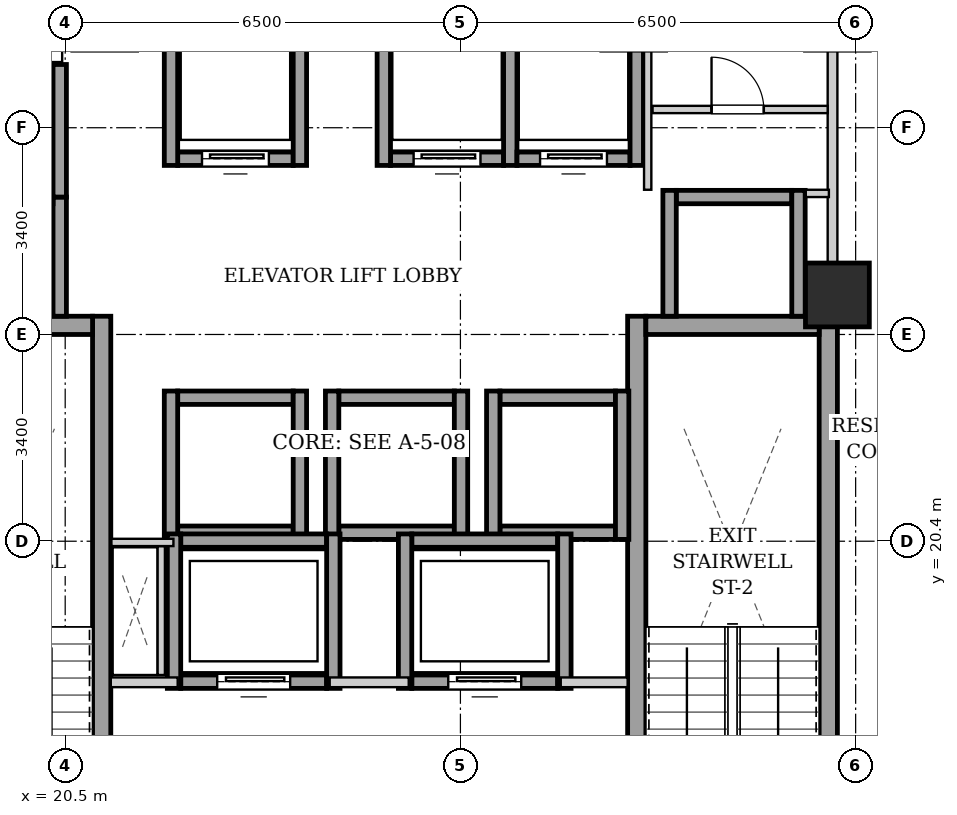
"""IFC4 building model, lengths in metres.
Left out: names, types, materials, properties, quantities, classifications, styles, units other than length and angle.
Written with IfcOpenShell. Run it as: python <this file> out.ifc"""

import sys

from ifc_helpers import new_model, si_unit, direction, frame, frame_2d, origin, origin_2d, place, context, subcontext, project, spatial, rectangle, extrude, element, fill, save


model = new_model("IFC4")
c1 = context("Model", 3, precision=1e-05, world=origin(), true_north=direction((0.0, 1.0)))
c2 = subcontext(c1, "Body", "Model", "MODEL_VIEW")
j1 = project(units=[si_unit("LENGTHUNIT", "METRE"), si_unit("PLANEANGLEUNIT", "RADIAN")], contexts=[c1])
p1 = place(None, origin())
s1 = spatial("IfcSite", under=j1, at=p1, CompositionType="ELEMENT")
p2 = place(p1, origin())
s2 = spatial("IfcBuilding", under=s1, at=p2, CompositionType="ELEMENT")
p3 = place(p2, frame((0.0, 0.0, 78.3)))
s3 = spatial("IfcBuildingStorey", under=s2, at=p3, CompositionType="ELEMENT", Elevation=78.3)
p4 = place(p3, frame((33.2, 24.45, 0.0), z_axis=(0.0, 0.0, 1.0), x_axis=(1.0, 0.0, 0.0)))
e1 = element("IfcColumn", 1, at=p4, inside=s3, PredefinedType="COLUMN", context=c2, shape_type="SweptSolid", body=[
    extrude(rectangle(XDim=1.05, YDim=1.05, at=origin_2d()), origin(), (0.0, 0.0, 1.0), 3.2),
])
p5 = place(p3, frame((21.1, 15.1, 0.0), z_axis=(0.0, 0.0, 1.0), x_axis=(0.0, 1.0, 0.0)))
e2 = element("IfcWall", 2, at=p5, inside=s3, PredefinedType="SHEAR", context=c2, shape_type="SweptSolid", body=[
    extrude(rectangle(XDim=9.0, YDim=0.3, at=frame_2d((4.5, 0.0))), origin(), (0.0, 0.0, 1.0), 2.94),
])
p6 = place(p3, frame((18.1, 23.95, 0.0), z_axis=(0.0, 0.0, 1.0), x_axis=(1.0, 0.0, 0.0)))
e3 = element("IfcWall", 3, at=p6, inside=s3, PredefinedType="SHEAR", context=c2, shape_type="SweptSolid", body=[
    extrude(rectangle(XDim=2.85, YDim=0.3, at=frame_2d((1.425, 0.0))), origin(), (0.0, 0.0, 1.0), 2.94),
])
for number, where, z_axis, x_axis in (
    (4, (29.9, 15.1, 0.0), (0.0, 0.0, 1.0), (0.0, 1.0, 0.0)),
    (5, (33.05, 15.1, 0.0), (0.0, 0.0, 1.0), (0.0, 1.0, 0.0)),
):
    element("IfcWall", number, at=place(p3, frame(where, z_axis=z_axis, x_axis=x_axis)), inside=s3, PredefinedType="SHEAR", context=c2, shape_type="SweptSolid", body=[
        extrude(rectangle(XDim=9.0, YDim=0.3, at=frame_2d((4.5, 0.0))), origin(), (0.0, 0.0, 1.0), 2.94),
    ])
p7 = place(p3, frame((30.05, 23.95, 0.0), z_axis=(0.0, 0.0, 1.0), x_axis=(1.0, 0.0, 0.0)))
e6 = element("IfcWall", 6, at=p7, inside=s3, PredefinedType="SHEAR", context=c2, shape_type="SweptSolid", body=[
    extrude(rectangle(XDim=2.85, YDim=0.3, at=frame_2d((1.425, 0.0))), origin(), (0.0, 0.0, 1.0), 2.94),
])
p8 = place(p3, frame((22.35, 26.69, 0.0), z_axis=(0.0, 0.0, 1.0), x_axis=(1.0, 0.0, 0.0)))
e7 = element("IfcWall", 7, at=p8, inside=s3, PredefinedType="SHEAR", context=c2, shape_type="SweptSolid", body=[
    extrude(rectangle(XDim=1.9, YDim=0.22, at=frame_2d((0.95, 0.0))), origin(), (0.0, 0.0, 1.0), 2.94),
])
p9 = place(p8, frame((0.4, 0.0, 0.0)))
e8 = element("IfcOpeningElement", 8, at=p9, cuts=e7, PredefinedType="OPENING", context=c2, shape_type="SweptSolid", body=[
    extrude(rectangle(XDim=1.1, YDim=2.15, at=frame_2d((0.55, 1.075))), frame((0.0, 0.12, 0.0), z_axis=(0.0, -1.0, 0.0), x_axis=(1.0, 0.0, 0.0)), (0.0, 0.0, 1.0), 0.24),
])
for number, where, z_axis, x_axis in (
    (9, (22.24, 26.58, 0.0), (0.0, 0.0, 1.0), (0.0, 1.0, 0.0)),
    (10, (24.36, 26.58, 0.0), (0.0, 0.0, 1.0), (0.0, 1.0, 0.0)),
):
    element("IfcWall", number, at=place(p3, frame(where, z_axis=z_axis, x_axis=x_axis)), inside=s3, PredefinedType="SHEAR", context=c2, shape_type="SweptSolid", body=[
        extrude(rectangle(XDim=2.44, YDim=0.22, at=frame_2d((1.22, 0.0))), origin(), (0.0, 0.0, 1.0), 2.94),
    ])
p10 = place(p3, frame((25.85, 26.69, 0.0), z_axis=(0.0, 0.0, 1.0), x_axis=(1.0, 0.0, 0.0)))
e11 = element("IfcWall", 11, at=p10, inside=s3, PredefinedType="SHEAR", context=c2, shape_type="SweptSolid", body=[
    extrude(rectangle(XDim=1.86, YDim=0.22, at=frame_2d((0.93, 0.0))), origin(), (0.0, 0.0, 1.0), 2.94),
])
p11 = place(p10, frame((0.38, 0.0, 0.0)))
e12 = element("IfcOpeningElement", 12, at=p11, cuts=e11, PredefinedType="OPENING", context=c2, shape_type="SweptSolid", body=[
    extrude(rectangle(XDim=1.1, YDim=2.15, at=frame_2d((0.55, 1.075))), frame((0.0, 0.12, 0.0), z_axis=(0.0, -1.0, 0.0), x_axis=(1.0, 0.0, 0.0)), (0.0, 0.0, 1.0), 0.24),
])
for number, where, z_axis, x_axis in (
    (13, (25.74, 26.58, 0.0), (0.0, 0.0, 1.0), (0.0, 1.0, 0.0)),
    (14, (27.82, 26.58, 0.0), (0.0, 0.0, 1.0), (0.0, 1.0, 0.0)),
):
    element("IfcWall", number, at=place(p3, frame(where, z_axis=z_axis, x_axis=x_axis)), inside=s3, PredefinedType="SHEAR", context=c2, shape_type="SweptSolid", body=[
        extrude(rectangle(XDim=2.44, YDim=0.22, at=frame_2d((1.22, 0.0))), origin(), (0.0, 0.0, 1.0), 2.94),
    ])
p12 = place(p3, frame((27.93, 26.69, 0.0), z_axis=(0.0, 0.0, 1.0), x_axis=(1.0, 0.0, 0.0)))
e15 = element("IfcWall", 15, at=p12, inside=s3, PredefinedType="SHEAR", context=c2, shape_type="SweptSolid", body=[
    extrude(rectangle(XDim=1.86, YDim=0.22, at=frame_2d((0.93, 0.0))), origin(), (0.0, 0.0, 1.0), 2.94),
])
p13 = place(p12, frame((0.38, 0.0, 0.0)))
e16 = element("IfcOpeningElement", 16, at=p13, cuts=e15, PredefinedType="OPENING", context=c2, shape_type="SweptSolid", body=[
    extrude(rectangle(XDim=1.1, YDim=2.15, at=frame_2d((0.55, 1.075))), frame((0.0, 0.12, 0.0), z_axis=(0.0, -1.0, 0.0), x_axis=(1.0, 0.0, 0.0)), (0.0, 0.0, 1.0), 0.24),
])
p14 = place(p3, frame((29.9, 26.58, 0.0), z_axis=(0.0, 0.0, 1.0), x_axis=(0.0, 1.0, 0.0)))
e17 = element("IfcWall", 17, at=p14, inside=s3, PredefinedType="SHEAR", context=c2, shape_type="SweptSolid", body=[
    extrude(rectangle(XDim=2.44, YDim=0.22, at=frame_2d((1.22, 0.0))), origin(), (0.0, 0.0, 1.0), 2.94),
])
for number, where, z_axis, x_axis in (
    (18, (22.35, 20.54, 0.0), (0.0, 0.0, 1.0), (1.0, 0.0, 0.0)),
    (19, (22.35, 22.76, 0.0), (0.0, 0.0, 1.0), (1.0, 0.0, 0.0)),
):
    element("IfcWall", number, at=place(p3, frame(where, z_axis=z_axis, x_axis=x_axis)), inside=s3, PredefinedType="SHEAR", context=c2, shape_type="SweptSolid", body=[
        extrude(rectangle(XDim=1.9, YDim=0.22, at=frame_2d((0.95, 0.0))), origin(), (0.0, 0.0, 1.0), 2.94),
    ])
for number, where, z_axis, x_axis in (
    (20, (22.24, 20.43, 0.0), (0.0, 0.0, 1.0), (0.0, 1.0, 0.0)),
    (21, (24.36, 20.43, 0.0), (0.0, 0.0, 1.0), (0.0, 1.0, 0.0)),
):
    element("IfcWall", number, at=place(p3, frame(where, z_axis=z_axis, x_axis=x_axis)), inside=s3, PredefinedType="SHEAR", context=c2, shape_type="SweptSolid", body=[
        extrude(rectangle(XDim=2.44, YDim=0.22, at=frame_2d((1.22, 0.0))), origin(), (0.0, 0.0, 1.0), 2.94),
    ])
for number, where, z_axis, x_axis in (
    (22, (25.0, 20.54, 0.0), (0.0, 0.0, 1.0), (1.0, 0.0, 0.0)),
    (23, (25.0, 22.76, 0.0), (0.0, 0.0, 1.0), (1.0, 0.0, 0.0)),
):
    element("IfcWall", number, at=place(p3, frame(where, z_axis=z_axis, x_axis=x_axis)), inside=s3, PredefinedType="SHEAR", context=c2, shape_type="SweptSolid", body=[
        extrude(rectangle(XDim=1.9, YDim=0.22, at=frame_2d((0.95, 0.0))), origin(), (0.0, 0.0, 1.0), 2.94),
    ])
for number, where, z_axis, x_axis in (
    (24, (24.89, 20.43, 0.0), (0.0, 0.0, 1.0), (0.0, 1.0, 0.0)),
    (25, (27.01, 20.43, 0.0), (0.0, 0.0, 1.0), (0.0, 1.0, 0.0)),
):
    element("IfcWall", number, at=place(p3, frame(where, z_axis=z_axis, x_axis=x_axis)), inside=s3, PredefinedType="SHEAR", context=c2, shape_type="SweptSolid", body=[
        extrude(rectangle(XDim=2.44, YDim=0.22, at=frame_2d((1.22, 0.0))), origin(), (0.0, 0.0, 1.0), 2.94),
    ])
for number, where, z_axis, x_axis in (
    (26, (27.65, 20.54, 0.0), (0.0, 0.0, 1.0), (1.0, 0.0, 0.0)),
    (27, (27.65, 22.76, 0.0), (0.0, 0.0, 1.0), (1.0, 0.0, 0.0)),
):
    element("IfcWall", number, at=place(p3, frame(where, z_axis=z_axis, x_axis=x_axis)), inside=s3, PredefinedType="SHEAR", context=c2, shape_type="SweptSolid", body=[
        extrude(rectangle(XDim=1.9, YDim=0.22, at=frame_2d((0.95, 0.0))), origin(), (0.0, 0.0, 1.0), 2.94),
    ])
for number, where, z_axis, x_axis in (
    (28, (27.54, 20.43, 0.0), (0.0, 0.0, 1.0), (0.0, 1.0, 0.0)),
    (29, (29.66, 20.43, 0.0), (0.0, 0.0, 1.0), (0.0, 1.0, 0.0)),
):
    element("IfcWall", number, at=place(p3, frame(where, z_axis=z_axis, x_axis=x_axis)), inside=s3, PredefinedType="SHEAR", context=c2, shape_type="SweptSolid", body=[
        extrude(rectangle(XDim=2.44, YDim=0.22, at=frame_2d((1.22, 0.0))), origin(), (0.0, 0.0, 1.0), 2.94),
    ])
p15 = place(p3, frame((20.41, 24.1, 0.0), z_axis=(0.0, 0.0, 1.0), x_axis=(0.0, 1.0, 0.0)))
e30 = element("IfcWall", 30, at=p15, inside=s3, PredefinedType="SHEAR", context=c2, shape_type="SweptSolid", body=[
    extrude(rectangle(XDim=1.96, YDim=0.22, at=frame_2d((0.98, 0.0))), origin(), (0.0, 0.0, 1.0), 2.94),
])
for number, where, z_axis, x_axis in (
    (31, (18.4, 26.06, 0.0), (0.0, 0.0, 1.0), (1.0, 0.0, 0.0)),
    (32, (18.4, 28.13, 0.0), (0.0, 0.0, 1.0), (1.0, 0.0, 0.0)),
):
    element("IfcWall", number, at=place(p3, frame(where, z_axis=z_axis, x_axis=x_axis)), inside=s3, PredefinedType="SHEAR", context=c2, shape_type="SweptSolid", body=[
        extrude(rectangle(XDim=1.9, YDim=0.22, at=frame_2d((0.95, 0.0))), origin(), (0.0, 0.0, 1.0), 2.94),
    ])
p16 = place(p3, frame((20.41, 26.06, 0.0), z_axis=(0.0, 0.0, 1.0), x_axis=(0.0, 1.0, 0.0)))
e33 = element("IfcWall", 33, at=p16, inside=s3, PredefinedType="SHEAR", context=c2, shape_type="SweptSolid", body=[
    extrude(rectangle(XDim=2.18, YDim=0.22, at=frame_2d((1.09, 0.0))), origin(), (0.0, 0.0, 1.0), 2.94),
])
p17 = place(p3, frame((30.55, 26.06, 0.0), z_axis=(0.0, 0.0, 1.0), x_axis=(1.0, 0.0, 0.0)))
e34 = element("IfcWall", 34, at=p17, inside=s3, PredefinedType="SHEAR", context=c2, shape_type="SweptSolid", body=[
    extrude(rectangle(XDim=1.9, YDim=0.22, at=frame_2d((0.95, 0.0))), origin(), (0.0, 0.0, 1.0), 2.94),
])
for number, where, z_axis, x_axis in (
    (35, (30.44, 24.1, 0.0), (0.0, 0.0, 1.0), (0.0, 1.0, 0.0)),
    (36, (32.56, 24.1, 0.0), (0.0, 0.0, 1.0), (0.0, 1.0, 0.0)),
):
    element("IfcWall", number, at=place(p3, frame(where, z_axis=z_axis, x_axis=x_axis)), inside=s3, PredefinedType="SHEAR", context=c2, shape_type="SweptSolid", body=[
        extrude(rectangle(XDim=2.07, YDim=0.22, at=frame_2d((1.035, 0.0))), origin(), (0.0, 0.0, 1.0), 2.94),
    ])
p18 = place(p3, frame((22.4, 18.09, 0.0), z_axis=(0.0, 0.0, 1.0), x_axis=(1.0, 0.0, 0.0)))
e37 = element("IfcWall", 37, at=p18, inside=s3, PredefinedType="SHEAR", context=c2, shape_type="SweptSolid", body=[
    extrude(rectangle(XDim=2.4, YDim=0.22, at=frame_2d((1.2, 0.0))), origin(), (0.0, 0.0, 1.0), 2.94),
])
p19 = place(p18, frame((0.6, 0.0, 0.0)))
e38 = element("IfcOpeningElement", 38, at=p19, cuts=e37, PredefinedType="OPENING", context=c2, shape_type="SweptSolid", body=[
    extrude(rectangle(XDim=1.2, YDim=2.15, at=frame_2d((0.6, 1.075))), frame((0.0, 0.12, 0.0), z_axis=(0.0, -1.0, 0.0), x_axis=(1.0, 0.0, 0.0)), (0.0, 0.0, 1.0), 0.24),
])
p20 = place(p3, frame((22.4, 20.41, 0.0), z_axis=(0.0, 0.0, 1.0), x_axis=(1.0, 0.0, 0.0)))
e39 = element("IfcWall", 39, at=p20, inside=s3, PredefinedType="SHEAR", context=c2, shape_type="SweptSolid", body=[
    extrude(rectangle(XDim=2.4, YDim=0.22, at=frame_2d((1.2, 0.0))), origin(), (0.0, 0.0, 1.0), 2.94),
])
for number, where, z_axis, x_axis in (
    (40, (22.29, 17.98, 0.0), (0.0, 0.0, 1.0), (0.0, 1.0, 0.0)),
    (41, (24.91, 17.98, 0.0), (0.0, 0.0, 1.0), (0.0, 1.0, 0.0)),
):
    element("IfcWall", number, at=place(p3, frame(where, z_axis=z_axis, x_axis=x_axis)), inside=s3, PredefinedType="SHEAR", context=c2, shape_type="SweptSolid", body=[
        extrude(rectangle(XDim=2.54, YDim=0.22, at=frame_2d((1.27, 0.0))), origin(), (0.0, 0.0, 1.0), 2.94),
    ])
p21 = place(p3, frame((26.2, 18.09, 0.0), z_axis=(0.0, 0.0, 1.0), x_axis=(1.0, 0.0, 0.0)))
e42 = element("IfcWall", 42, at=p21, inside=s3, PredefinedType="SHEAR", context=c2, shape_type="SweptSolid", body=[
    extrude(rectangle(XDim=2.4, YDim=0.22, at=frame_2d((1.2, 0.0))), origin(), (0.0, 0.0, 1.0), 2.94),
])
p22 = place(p21, frame((0.6, 0.0, 0.0)))
e43 = element("IfcOpeningElement", 43, at=p22, cuts=e42, PredefinedType="OPENING", context=c2, shape_type="SweptSolid", body=[
    extrude(rectangle(XDim=1.2, YDim=2.15, at=frame_2d((0.6, 1.075))), frame((0.0, 0.12, 0.0), z_axis=(0.0, -1.0, 0.0), x_axis=(1.0, 0.0, 0.0)), (0.0, 0.0, 1.0), 0.24),
])
p23 = place(p3, frame((26.2, 20.41, 0.0), z_axis=(0.0, 0.0, 1.0), x_axis=(1.0, 0.0, 0.0)))
e44 = element("IfcWall", 44, at=p23, inside=s3, PredefinedType="SHEAR", context=c2, shape_type="SweptSolid", body=[
    extrude(rectangle(XDim=2.4, YDim=0.22, at=frame_2d((1.2, 0.0))), origin(), (0.0, 0.0, 1.0), 2.94),
])
for number, where, z_axis, x_axis in (
    (45, (26.09, 17.98, 0.0), (0.0, 0.0, 1.0), (0.0, 1.0, 0.0)),
    (46, (28.71, 17.98, 0.0), (0.0, 0.0, 1.0), (0.0, 1.0, 0.0)),
):
    element("IfcWall", number, at=place(p3, frame(where, z_axis=z_axis, x_axis=x_axis)), inside=s3, PredefinedType="SHEAR", context=c2, shape_type="SweptSolid", body=[
        extrude(rectangle(XDim=2.54, YDim=0.22, at=frame_2d((1.27, 0.0))), origin(), (0.0, 0.0, 1.0), 2.94),
    ])
p24 = place(p3, frame((21.25, 18.08, 0.0), z_axis=(0.0, 0.0, 1.0), x_axis=(1.0, 0.0, 0.0)))
e47 = element("IfcWall", 47, at=p24, inside=s3, PredefinedType="PARTITIONING", context=c2, shape_type="SweptSolid", body=[
    extrude(rectangle(XDim=1.1, YDim=0.16, at=frame_2d((0.55, 0.0))), origin(), (0.0, 0.0, 1.0), 2.94),
])
p25 = place(p3, frame((24.85, 18.08, 0.0), z_axis=(0.0, 0.0, 1.0), x_axis=(1.0, 0.0, 0.0)))
e48 = element("IfcWall", 48, at=p25, inside=s3, PredefinedType="PARTITIONING", context=c2, shape_type="SweptSolid", body=[
    extrude(rectangle(XDim=1.3, YDim=0.16, at=frame_2d((0.65, 0.0))), origin(), (0.0, 0.0, 1.0), 2.94),
])
p26 = place(p3, frame((28.65, 18.08, 0.0), z_axis=(0.0, 0.0, 1.0), x_axis=(1.0, 0.0, 0.0)))
e49 = element("IfcWall", 49, at=p26, inside=s3, PredefinedType="PARTITIONING", context=c2, shape_type="SweptSolid", body=[
    extrude(rectangle(XDim=1.1, YDim=0.16, at=frame_2d((0.55, 0.0))), origin(), (0.0, 0.0, 1.0), 2.94),
])
p27 = place(p3, frame((33.12, 24.12, 0.0), z_axis=(0.0, 0.0, 1.0), x_axis=(0.0, 1.0, 0.0)))
e50 = element("IfcWall", 50, at=p27, inside=s3, PredefinedType="PARTITIONING", context=c2, shape_type="SweptSolid", body=[
    extrude(rectangle(XDim=4.76, YDim=0.16, at=frame_2d((2.38, 0.0))), origin(), (0.0, 0.0, 1.0), 2.275),
])
p28 = place(p3, frame((22.08, 18.2, 0.0), z_axis=(0.0, 0.0, 1.0), x_axis=(0.0, 1.0, 0.0)))
e51 = element("IfcWall", 51, at=p28, inside=s3, PredefinedType="PARTITIONING", context=c2, shape_type="SweptSolid", body=[
    extrude(rectangle(XDim=2.12, YDim=0.12, at=frame_2d((1.06, 0.0))), origin(), (0.0, 0.0, 1.0), 2.94),
])
p29 = place(p3, frame((22.28, 20.38, 0.0), z_axis=(0.0, 0.0, 1.0), x_axis=(-1.0, 0.0, 0.0)))
e52 = element("IfcWall", 52, at=p29, inside=s3, PredefinedType="PARTITIONING", context=c2, shape_type="SweptSolid", body=[
    extrude(rectangle(XDim=1.02, YDim=0.12, at=frame_2d((0.51, 0.0))), origin(), (0.0, 0.0, 1.0), 2.94),
])
p30 = place(p3, frame((30.08, 26.18, 0.0), z_axis=(0.0, 0.0, 1.0), x_axis=(0.0, 1.0, 0.0)))
e53 = element("IfcWall", 53, at=p30, inside=s3, PredefinedType="PARTITIONING", context=c2, shape_type="SweptSolid", body=[
    extrude(rectangle(XDim=2.68, YDim=0.12, at=frame_2d((1.34, 0.0))), origin(), (0.0, 0.0, 1.0), 2.94),
])
p31 = place(p3, frame((32.68, 26.12, 0.0), z_axis=(0.0, 0.0, 1.0), x_axis=(1.0, 0.0, 0.0)))
e54 = element("IfcWall", 54, at=p31, inside=s3, PredefinedType="PARTITIONING", context=c2, shape_type="SweptSolid", body=[
    extrude(rectangle(XDim=0.38, YDim=0.12, at=frame_2d((0.19, 0.0))), origin(), (0.0, 0.0, 1.0), 2.94),
])
p32 = place(p3, frame((30.16, 27.5, 0.0), z_axis=(0.0, 0.0, 1.0), x_axis=(1.0, 0.0, 0.0)))
e55 = element("IfcWall", 55, at=p32, inside=s3, PredefinedType="PARTITIONING", context=c2, shape_type="SweptSolid", body=[
    extrude(rectangle(XDim=2.88, YDim=0.12, at=frame_2d((1.44, 0.0))), origin(), (0.0, 0.0, 1.0), 2.94),
])
p33 = place(p32, frame((0.97, 0.0, 0.0)))
e56 = element("IfcOpeningElement", 56, at=p33, cuts=e55, PredefinedType="OPENING", context=c2, shape_type="SweptSolid", body=[
    extrude(rectangle(XDim=0.86, YDim=2.05, at=frame_2d((0.43, 1.025))), frame((0.0, 0.07, 0.0), z_axis=(0.0, -1.0, 0.0), x_axis=(1.0, 0.0, 0.0)), (0.0, 0.0, 1.0), 0.14),
])
p34 = place(p9, origin())
e57 = element("IfcDoor", 57, at=p34, inside=s3, OperationType="SLIDING_TO_LEFT", PredefinedType="DOOR", context=c2, shape_type="SweptSolid", body=[
    extrude(rectangle(XDim=1.1, YDim=2.15, at=frame_2d((0.55, 1.075))), frame((0.0, 0.025, 0.0), z_axis=(0.0, -1.0, 0.0), x_axis=(1.0, 0.0, 0.0)), (0.0, 0.0, 1.0), 0.05),
])
fill(e8, e57)
p35 = place(p11, origin())
e58 = element("IfcDoor", 58, at=p35, inside=s3, OperationType="SLIDING_TO_LEFT", PredefinedType="DOOR", context=c2, shape_type="SweptSolid", body=[
    extrude(rectangle(XDim=1.1, YDim=2.15, at=frame_2d((0.55, 1.075))), frame((0.0, 0.025, 0.0), z_axis=(0.0, -1.0, 0.0), x_axis=(1.0, 0.0, 0.0)), (0.0, 0.0, 1.0), 0.05),
])
fill(e12, e58)
p36 = place(p13, origin())
e59 = element("IfcDoor", 59, at=p36, inside=s3, OperationType="SLIDING_TO_LEFT", PredefinedType="DOOR", context=c2, shape_type="SweptSolid", body=[
    extrude(rectangle(XDim=1.1, YDim=2.15, at=frame_2d((0.55, 1.075))), frame((0.0, 0.025, 0.0), z_axis=(0.0, -1.0, 0.0), x_axis=(1.0, 0.0, 0.0)), (0.0, 0.0, 1.0), 0.05),
])
fill(e16, e59)
p37 = place(p19, origin())
e60 = element("IfcDoor", 60, at=p37, inside=s3, OperationType="SLIDING_TO_LEFT", PredefinedType="DOOR", context=c2, shape_type="SweptSolid", body=[
    extrude(rectangle(XDim=1.2, YDim=2.15, at=frame_2d((0.6, 1.075))), frame((0.0, 0.025, 0.0), z_axis=(0.0, -1.0, 0.0), x_axis=(1.0, 0.0, 0.0)), (0.0, 0.0, 1.0), 0.05),
])
fill(e38, e60)
p38 = place(p22, origin())
e61 = element("IfcDoor", 61, at=p38, inside=s3, OperationType="SLIDING_TO_LEFT", PredefinedType="DOOR", context=c2, shape_type="SweptSolid", body=[
    extrude(rectangle(XDim=1.2, YDim=2.15, at=frame_2d((0.6, 1.075))), frame((0.0, 0.025, 0.0), z_axis=(0.0, -1.0, 0.0), x_axis=(1.0, 0.0, 0.0)), (0.0, 0.0, 1.0), 0.05),
])
fill(e43, e61)
p39 = place(p33, origin())
e62 = element("IfcDoor", 62, at=p39, inside=s3, OperationType="SINGLE_SWING_LEFT", PredefinedType="DOOR", context=c2, shape_type="SweptSolid", body=[
    extrude(rectangle(XDim=0.86, YDim=2.05, at=frame_2d((0.43, 1.025))), frame((0.0, 0.025, 0.0), z_axis=(0.0, -1.0, 0.0), x_axis=(1.0, 0.0, 0.0)), (0.0, 0.0, 1.0), 0.05),
])
fill(e56, e62)
save(model, sys.argv[1])
